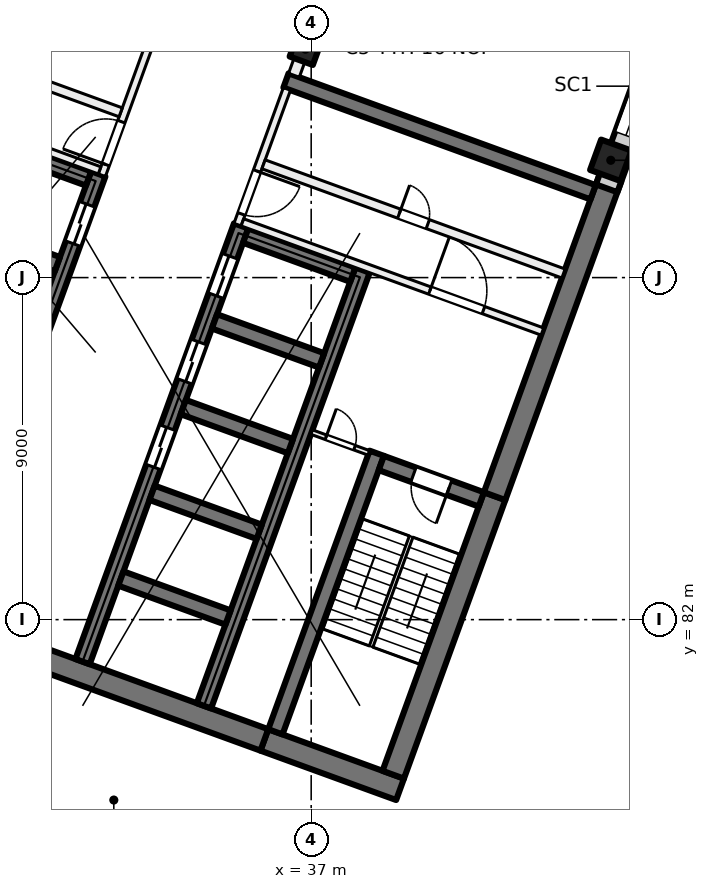
"""IFC4 building model, lengths in metres.
Left out: names, types, materials, properties, quantities, classifications, styles, units other than length and angle.
Written with IfcOpenShell. Run it as: python <this file> out.ifc"""

import sys

from ifc_helpers import new_model, si_unit, direction, frame, frame_2d, origin, origin_2d, place, context, subcontext, project, spatial, rectangle, extrude, element, fill, save


model = new_model("IFC4")
c1 = context("Model", 3, precision=1e-05, world=origin(), true_north=direction((0.0, 1.0)))
c2 = subcontext(c1, "Body", "Model", "MODEL_VIEW")
j1 = project(units=[si_unit("LENGTHUNIT", "METRE"), si_unit("PLANEANGLEUNIT", "RADIAN")], contexts=[c1])
p1 = place(None, origin())
s1 = spatial("IfcSite", under=j1, at=p1, CompositionType="ELEMENT")
p2 = place(p1, origin())
s2 = spatial("IfcBuilding", under=s1, at=p2, CompositionType="ELEMENT")
p3 = place(p2, frame((0.0, 0.0, 101.0)))
s3 = spatial("IfcBuildingStorey", under=s2, at=p3, CompositionType="ELEMENT", Elevation=101.0)
p4 = place(p3, frame((36.849, 97.011, 0.0), z_axis=(0.0, 0.0, 1.0), x_axis=(-0.342020143326, -0.939692620786, 0.0)))
e1 = element("IfcColumn", 1, at=p4, inside=s3, PredefinedType="COLUMN", context=c2, shape_type="SweptSolid", body=[
    extrude(rectangle(XDim=0.65, YDim=0.65, at=origin_2d()), origin(), (0.0, 0.0, 1.0), 4.0),
])
p5 = place(p3, frame((44.884, 94.087, 0.0), z_axis=(0.0, 0.0, 1.0), x_axis=(-0.342020143326, -0.939692620786, 0.0)))
e2 = element("IfcColumn", 2, at=p5, inside=s3, PredefinedType="COLUMN", context=c2, shape_type="SweptSolid", body=[
    extrude(rectangle(XDim=0.85, YDim=0.85, at=origin_2d()), origin(), (0.0, 0.0, 1.0), 4.0),
])
p6 = place(p3, frame((39.338, 77.535, 0.0), z_axis=(0.0, 0.0, 1.0), x_axis=(-0.939701471648, 0.341995824804, 0.0)))
e3 = element("IfcWall", 3, at=p6, inside=s3, PredefinedType="SHEAR", context=c2, shape_type="SweptSolid", body=[
    extrude(rectangle(XDim=3.8, YDim=0.6, at=frame_2d((1.9, 0.0))), origin(), (0.0, 0.0, 1.0), 4.0),
])
p7 = place(p3, frame((35.767, 78.835, 0.0), z_axis=(0.0, 0.0, 1.0), x_axis=(-0.939692894512, 0.342019391267, 0.0)))
e4 = element("IfcWall", 4, at=p7, inside=s3, PredefinedType="SHEAR", context=c2, shape_type="SweptSolid", body=[
    extrude(rectangle(XDim=14.4, YDim=0.6, at=frame_2d((7.2, 0.0))), origin(), (0.0, 0.0, 1.0), 4.0),
])
p8 = place(p3, frame((39.159, 77.92, 0.0), z_axis=(0.0, 0.0, 1.0), x_axis=(0.342016982193, 0.939693771338, 0.0)))
e5 = element("IfcWall", 5, at=p8, inside=s3, PredefinedType="SHEAR", context=c2, shape_type="SweptSolid", body=[
    extrude(rectangle(XDim=7.8, YDim=0.6, at=frame_2d((3.9, 0.0))), origin(), (0.0, 0.0, 1.0), 4.0),
])
p9 = place(p3, frame((41.827, 85.249, 0.0), z_axis=(0.0, 0.0, 1.0), x_axis=(0.342017595281, 0.939693548195, 0.0)))
e6 = element("IfcWall", 6, at=p9, inside=s3, PredefinedType="SHEAR", context=c2, shape_type="SweptSolid", body=[
    extrude(rectangle(XDim=8.925, YDim=0.6, at=frame_2d((4.462, 0.0))), origin(), (0.0, 0.0, 1.0), 4.0),
])
p10 = place(p3, frame((36.058, 79.048, 0.0), z_axis=(0.0, 0.0, 1.0), x_axis=(0.342016982193, 0.939693771338, 0.0)))
e7 = element("IfcWall", 7, at=p10, inside=s3, PredefinedType="SHEAR", context=c2, shape_type="SweptSolid", body=[
    extrude(rectangle(XDim=7.8, YDim=0.4, at=frame_2d((3.9, 0.0))), origin(), (0.0, 0.0, 1.0), 4.0),
])
p11 = place(p3, frame((41.476, 85.164, 0.0), z_axis=(0.0, 0.0, 1.0), x_axis=(-0.939678810556, 0.342058084236, 0.0)))
e8 = element("IfcWall", 8, at=p11, inside=s3, PredefinedType="SHEAR", context=c2, shape_type="SweptSolid", body=[
    extrude(rectangle(XDim=2.8, YDim=0.4, at=frame_2d((1.4, 0.0))), origin(), (0.0, 0.0, 1.0), 4.0),
])
p12 = place(p11, frame((0.9, 0.0, 0.0)))
e9 = element("IfcOpeningElement", 9, at=p12, cuts=e8, PredefinedType="OPENING", context=c2, shape_type="SweptSolid", body=[
    extrude(rectangle(XDim=1.0, YDim=2.1, at=frame_2d((0.5, 1.05))), frame((0.0, 0.21, 0.0), z_axis=(0.0, -1.0, 0.0), x_axis=(1.0, 0.0, 0.0)), (0.0, 0.0, 1.0), 0.42),
])
p13 = place(p3, frame((30.984, 80.895, 0.0), z_axis=(0.0, 0.0, 1.0), x_axis=(0.342021021735, 0.939692301071, 0.0)))
e10 = element("IfcWall", 10, at=p13, inside=s3, PredefinedType="SHEAR", context=c2, shape_type="SweptSolid", body=[
    extrude(rectangle(XDim=12.2, YDim=0.4, at=frame_2d((6.1, 0.0))), origin(), (0.0, 0.0, 1.0), 4.0),
])
p14 = place(p13, frame((5.45, 0.0, 0.0)))
e11 = element("IfcOpeningElement", 11, at=p14, cuts=e10, PredefinedType="OPENING", context=c2, shape_type="SweptSolid", body=[
    extrude(rectangle(XDim=1.1, YDim=2.1, at=frame_2d((0.55, 1.05))), frame((0.0, 0.21, 0.0), z_axis=(0.0, -1.0, 0.0), x_axis=(1.0, 0.0, 0.0)), (0.0, 0.0, 1.0), 0.42),
])
p15 = place(p13, frame((7.85, 0.0, 0.0)))
e12 = element("IfcOpeningElement", 12, at=p15, cuts=e10, PredefinedType="OPENING", context=c2, shape_type="SweptSolid", body=[
    extrude(rectangle(XDim=1.1, YDim=2.1, at=frame_2d((0.55, 1.05))), frame((0.0, 0.21, 0.0), z_axis=(0.0, -1.0, 0.0), x_axis=(1.0, 0.0, 0.0)), (0.0, 0.0, 1.0), 0.42),
])
p16 = place(p13, frame((10.25, 0.0, 0.0)))
e13 = element("IfcOpeningElement", 13, at=p16, cuts=e10, PredefinedType="OPENING", context=c2, shape_type="SweptSolid", body=[
    extrude(rectangle(XDim=1.1, YDim=2.1, at=frame_2d((0.55, 1.05))), frame((0.0, 0.21, 0.0), z_axis=(0.0, -1.0, 0.0), x_axis=(1.0, 0.0, 0.0)), (0.0, 0.0, 1.0), 0.42),
])
p17 = place(p3, frame((34.178, 79.732, 0.0), z_axis=(0.0, 0.0, 1.0), x_axis=(0.342014590177, 0.939694641948, 0.0)))
e14 = element("IfcWall", 14, at=p17, inside=s3, PredefinedType="SHEAR", context=c2, shape_type="SweptSolid", body=[
    extrude(rectangle(XDim=12.2, YDim=0.4, at=frame_2d((6.1, 0.0))), origin(), (0.0, 0.0, 1.0), 4.0),
])
for number, where, z_axis, x_axis in (
    (15, (34.812, 82.056, 0.0), (0.0, 0.0, 1.0), (-0.94, 0.342, 0.0)),
    (16, (35.632, 84.311, 0.0), (0.0, 0.0, 1.0), (-0.94, 0.342, 0.0)),
    (17, (36.453, 86.566, 0.0), (0.0, 0.0, 1.0), (-0.94, 0.342, 0.0)),
    (18, (37.274, 88.822, 0.0), (0.0, 0.0, 1.0), (-0.94, 0.342, 0.0)),
):
    element("IfcWall", number, at=place(p3, frame(where, z_axis=z_axis, x_axis=x_axis)), inside=s3, PredefinedType="SHEAR", context=c2, shape_type="SweptSolid", body=[
        extrude(rectangle(XDim=3.0, YDim=0.4, at=frame_2d((1.5, 0.0))), origin(), (0.0, 0.0, 1.0), 4.0),
    ])
p18 = place(p3, frame((38.095, 91.077, 0.0), z_axis=(0.0, 0.0, 1.0), x_axis=(-0.939676934218, 0.342063238742, 0.0)))
e19 = element("IfcWall", 19, at=p18, inside=s3, PredefinedType="SHEAR", context=c2, shape_type="SweptSolid", body=[
    extrude(rectangle(XDim=3.0, YDim=0.4, at=frame_2d((1.5, 0.0))), origin(), (0.0, 0.0, 1.0), 4.0),
])
p19 = place(p3, frame((27.225, 82.263, 0.0), z_axis=(0.0, 0.0, 1.0), x_axis=(0.342014590177, 0.939694641948, 0.0)))
e20 = element("IfcWall", 20, at=p19, inside=s3, PredefinedType="SHEAR", context=c2, shape_type="SweptSolid", body=[
    extrude(rectangle(XDim=12.2, YDim=0.4, at=frame_2d((6.1, 0.0))), origin(), (0.0, 0.0, 1.0), 4.0),
])
p20 = place(p19, frame((10.25, 0.0, 0.0)))
e21 = element("IfcOpeningElement", 21, at=p20, cuts=e20, PredefinedType="OPENING", context=c2, shape_type="SweptSolid", body=[
    extrude(rectangle(XDim=1.1, YDim=2.1, at=frame_2d((0.55, 1.05))), frame((0.0, 0.21, 0.0), z_axis=(0.0, -1.0, 0.0), x_axis=(1.0, 0.0, 0.0)), (0.0, 0.0, 1.0), 0.42),
])
p21 = place(p19, frame((0.7, 0.0, 0.0)))
e22 = element("IfcOpeningElement", 22, at=p21, cuts=e20, PredefinedType="OPENING", context=c2, shape_type="SweptSolid", body=[
    extrude(rectangle(XDim=0.8, YDim=2.1, at=frame_2d((0.4, 1.05))), frame((0.0, 0.21, 0.0), z_axis=(0.0, -1.0, 0.0), x_axis=(1.0, 0.0, 0.0)), (0.0, 0.0, 1.0), 0.42),
])
for number, where, z_axis, x_axis in (
    (23, (30.32, 91.353, 0.0), (0.0, 0.0, 1.0), (-0.94, 0.342, 0.0)),
    (24, (31.141, 93.608, 0.0), (0.0, 0.0, 1.0), (-0.94, 0.342, 0.0)),
):
    element("IfcWall", number, at=place(p3, frame(where, z_axis=z_axis, x_axis=x_axis)), inside=s3, PredefinedType="SHEAR", context=c2, shape_type="SweptSolid", body=[
        extrude(rectangle(XDim=3.0, YDim=0.4, at=frame_2d((1.5, 0.0))), origin(), (0.0, 0.0, 1.0), 4.0),
    ])
p22 = place(p3, frame((44.418, 93.245, 0.0), z_axis=(0.0, 0.0, 1.0), x_axis=(-0.93969060187, 0.342025690201, 0.0)))
e25 = element("IfcWall", 25, at=p22, inside=s3, PredefinedType="SHEAR", context=c2, shape_type="SweptSolid", body=[
    extrude(rectangle(XDim=8.6, YDim=0.4, at=frame_2d((4.3, 0.0))), origin(), (0.0, 0.0, 1.0), 4.0),
])
p23 = place(p3, frame((52.212, 113.783, 0.0), z_axis=(0.0, 0.0, 1.0), x_axis=(-0.34202521188, -0.939690775968, 0.0)))
e26 = element("IfcWall", 26, at=p23, inside=s3, PredefinedType="SOLIDWALL", context=c2, shape_type="SweptSolid", body=[
    extrude(rectangle(XDim=21.745, YDim=0.6, at=frame_2d((10.873, 0.0))), origin(), (0.0, 0.0, 1.0), 3.625),
])
p24 = place(p23, frame((3.765, 0.0, 0.9)))
e27 = element("IfcOpeningElement", 27, at=p24, cuts=e26, PredefinedType="OPENING", context=c2, shape_type="SweptSolid", body=[
    extrude(rectangle(XDim=3.0, YDim=2.4, at=frame_2d((1.5, 1.2))), frame((0.0, 0.31, 0.0), z_axis=(0.0, -1.0, 0.0), x_axis=(1.0, 0.0, 0.0)), (0.0, 0.0, 1.0), 0.62),
])
p25 = place(p23, frame((8.265, 0.0, 0.9)))
e28 = element("IfcOpeningElement", 28, at=p25, cuts=e26, PredefinedType="OPENING", context=c2, shape_type="SweptSolid", body=[
    extrude(rectangle(XDim=3.0, YDim=2.4, at=frame_2d((1.5, 1.2))), frame((0.0, 0.31, 0.0), z_axis=(0.0, -1.0, 0.0), x_axis=(1.0, 0.0, 0.0)), (0.0, 0.0, 1.0), 0.62),
])
p26 = place(p23, frame((12.765, 0.0, 0.9)))
e29 = element("IfcOpeningElement", 29, at=p26, cuts=e26, PredefinedType="OPENING", context=c2, shape_type="SweptSolid", body=[
    extrude(rectangle(XDim=3.0, YDim=2.4, at=frame_2d((1.5, 1.2))), frame((0.0, 0.31, 0.0), z_axis=(0.0, -1.0, 0.0), x_axis=(1.0, 0.0, 0.0)), (0.0, 0.0, 1.0), 0.62),
])
p27 = place(p23, frame((17.265, 0.0, 0.9)))
e30 = element("IfcOpeningElement", 30, at=p27, cuts=e26, PredefinedType="OPENING", context=c2, shape_type="SweptSolid", body=[
    extrude(rectangle(XDim=3.0, YDim=2.4, at=frame_2d((1.5, 1.2))), frame((0.0, 0.31, 0.0), z_axis=(0.0, -1.0, 0.0), x_axis=(1.0, 0.0, 0.0)), (0.0, 0.0, 1.0), 0.62),
])
p28 = place(p3, frame((31.491, 93.693, 0.0), z_axis=(0.0, 0.0, 1.0), x_axis=(0.341995824804, 0.939701471648, 0.0)))
e31 = element("IfcWall", 31, at=p28, inside=s3, PredefinedType="PARTITIONING", context=c2, shape_type="SweptSolid", body=[
    extrude(rectangle(XDim=3.8, YDim=0.2, at=frame_2d((1.9, 0.0))), origin(), (0.0, 0.0, 1.0), 3.625),
])
p29 = place(p28, frame((0.3, 0.0, 0.0)))
e32 = element("IfcOpeningElement", 32, at=p29, cuts=e31, PredefinedType="OPENING", context=c2, shape_type="SweptSolid", body=[
    extrude(rectangle(XDim=1.2, YDim=2.1, at=frame_2d((0.6, 1.05))), frame((0.0, 0.11, 0.0), z_axis=(0.0, -1.0, 0.0), x_axis=(1.0, 0.0, 0.0)), (0.0, 0.0, 1.0), 0.22),
])
p30 = place(p3, frame((23.538, 96.694, 0.0), z_axis=(0.0, 0.0, 1.0), x_axis=(0.939691552312, -0.342023078919, 0.0)))
e33 = element("IfcWall", 33, at=p30, inside=s3, PredefinedType="PARTITIONING", context=c2, shape_type="SweptSolid", body=[
    extrude(rectangle(XDim=8.4, YDim=0.2, at=frame_2d((4.2, 0.0))), origin(), (0.0, 0.0, 1.0), 3.625),
])
p31 = place(p30, frame((1.65, 0.0, 0.0)))
e34 = element("IfcOpeningElement", 34, at=p31, cuts=e33, PredefinedType="OPENING", context=c2, shape_type="SweptSolid", body=[
    extrude(rectangle(XDim=1.5, YDim=2.1, at=frame_2d((0.75, 1.05))), frame((0.0, 0.11, 0.0), z_axis=(0.0, -1.0, 0.0), x_axis=(1.0, 0.0, 0.0)), (0.0, 0.0, 1.0), 0.22),
])
p32 = place(p3, frame((24.094, 98.221, 0.0), z_axis=(0.0, 0.0, 1.0), x_axis=(0.939691552312, -0.342023078919, 0.0)))
e35 = element("IfcWall", 35, at=p32, inside=s3, PredefinedType="PARTITIONING", context=c2, shape_type="SweptSolid", body=[
    extrude(rectangle(XDim=8.4, YDim=0.25, at=frame_2d((4.2, 0.0))), origin(), (0.0, 0.0, 1.0), 3.625),
])
p33 = place(p32, frame((5.125, 0.0, 0.0)))
e36 = element("IfcOpeningElement", 36, at=p33, cuts=e35, PredefinedType="OPENING", context=c2, shape_type="SweptSolid", body=[
    extrude(rectangle(XDim=1.0, YDim=2.1, at=frame_2d((0.5, 1.05))), frame((0.0, 0.135, 0.0), z_axis=(0.0, -1.0, 0.0), x_axis=(1.0, 0.0, 0.0)), (0.0, 0.0, 1.0), 0.27),
])
p34 = place(p32, frame((0.875, 0.0, 0.0)))
e37 = element("IfcOpeningElement", 37, at=p34, cuts=e35, PredefinedType="OPENING", context=c2, shape_type="SweptSolid", body=[
    extrude(rectangle(XDim=1.0, YDim=2.1, at=frame_2d((0.5, 1.05))), frame((0.0, 0.135, 0.0), z_axis=(0.0, -1.0, 0.0), x_axis=(1.0, 0.0, 0.0)), (0.0, 0.0, 1.0), 0.27),
])
p35 = place(p3, frame((36.362, 95.964, 0.0), z_axis=(0.0, 0.0, 1.0), x_axis=(-0.341995824804, -0.939701471648, 0.0)))
e38 = element("IfcWall", 38, at=p35, inside=s3, PredefinedType="PARTITIONING", context=c2, shape_type="SweptSolid", body=[
    extrude(rectangle(XDim=3.8, YDim=0.2, at=frame_2d((1.9, 0.0))), origin(), (0.0, 0.0, 1.0), 3.625),
])
p36 = place(p35, frame((2.3, 0.0, 0.0)))
e39 = element("IfcOpeningElement", 39, at=p36, cuts=e38, PredefinedType="OPENING", context=c2, shape_type="SweptSolid", body=[
    extrude(rectangle(XDim=1.2, YDim=2.1, at=frame_2d((0.6, 1.05))), frame((0.0, 0.11, 0.0), z_axis=(0.0, -1.0, 0.0), x_axis=(1.0, 0.0, 0.0)), (0.0, 0.0, 1.0), 0.22),
])
p37 = place(p3, frame((35.19, 92.453, 0.0), z_axis=(0.0, 0.0, 1.0), x_axis=(0.939691552312, -0.342023078919, 0.0)))
e40 = element("IfcWall", 40, at=p37, inside=s3, PredefinedType="PARTITIONING", context=c2, shape_type="SweptSolid", body=[
    extrude(rectangle(XDim=8.4, YDim=0.2, at=frame_2d((4.2, 0.0))), origin(), (0.0, 0.0, 1.0), 3.625),
])
p38 = place(p37, frame((5.25, 0.0, 0.0)))
e41 = element("IfcOpeningElement", 41, at=p38, cuts=e40, PredefinedType="OPENING", context=c2, shape_type="SweptSolid", body=[
    extrude(rectangle(XDim=1.5, YDim=2.1, at=frame_2d((0.75, 1.05))), frame((0.0, 0.11, 0.0), z_axis=(0.0, -1.0, 0.0), x_axis=(1.0, 0.0, 0.0)), (0.0, 0.0, 1.0), 0.22),
])
p39 = place(p3, frame((35.746, 93.98, 0.0), z_axis=(0.0, 0.0, 1.0), x_axis=(0.939691552312, -0.342023078919, 0.0)))
e42 = element("IfcWall", 42, at=p39, inside=s3, PredefinedType="PARTITIONING", context=c2, shape_type="SweptSolid", body=[
    extrude(rectangle(XDim=8.4, YDim=0.25, at=frame_2d((4.2, 0.0))), origin(), (0.0, 0.0, 1.0), 3.625),
])
p40 = place(p39, frame((3.8, 0.0, 0.0)))
e43 = element("IfcOpeningElement", 43, at=p40, cuts=e42, PredefinedType="OPENING", context=c2, shape_type="SweptSolid", body=[
    extrude(rectangle(XDim=0.8, YDim=2.1, at=frame_2d((0.4, 1.05))), frame((0.0, 0.135, 0.0), z_axis=(0.0, -1.0, 0.0), x_axis=(1.0, 0.0, 0.0)), (0.0, 0.0, 1.0), 0.27),
])
p41 = place(p3, frame((37.013, 86.935, 0.0), z_axis=(0.0, 0.0, 1.0), x_axis=(0.939659694648, -0.342110593602, 0.0)))
e44 = element("IfcWall", 44, at=p41, inside=s3, PredefinedType="PARTITIONING", context=c2, shape_type="SweptSolid", body=[
    extrude(rectangle(XDim=1.6, YDim=0.125, at=frame_2d((0.8, 0.0))), origin(), (0.0, 0.0, 1.0), 3.625),
])
p42 = place(p41, frame((0.4, 0.0, 0.0)))
e45 = element("IfcOpeningElement", 45, at=p42, cuts=e44, PredefinedType="OPENING", context=c2, shape_type="SweptSolid", body=[
    extrude(rectangle(XDim=0.8, YDim=2.1, at=frame_2d((0.4, 1.05))), frame((0.0, 0.073, 0.0), z_axis=(0.0, -1.0, 0.0), x_axis=(1.0, 0.0, 0.0)), (0.0, 0.0, 1.0), 0.145),
])
p43 = place(p3, frame((47.314, 125.909, 0.0), z_axis=(0.0, 0.0, 1.0), x_axis=(-0.342010770371, -0.939696032209, 0.0)))
e46 = element("IfcWall", 46, at=p43, inside=s3, PredefinedType="PARTITIONING", context=c2, shape_type="SweptSolid", body=[
    extrude(rectangle(XDim=31.485, YDim=0.3, at=frame_2d((15.742, 0.0))), origin(), (0.0, 0.0, 1.0), 3.625),
])
p44 = place(p43, frame((26.11, 0.0, 0.0)))
e47 = element("IfcOpeningElement", 47, at=p44, cuts=e46, PredefinedType="OPENING", context=c2, shape_type="SweptSolid", body=[
    extrude(rectangle(XDim=1.0, YDim=2.1, at=frame_2d((0.5, 1.05))), frame((0.0, 0.16, 0.0), z_axis=(0.0, -1.0, 0.0), x_axis=(1.0, 0.0, 0.0)), (0.0, 0.0, 1.0), 0.32),
])
p45 = place(p43, frame((15.485, 0.0, 0.0)))
e48 = element("IfcOpeningElement", 48, at=p45, cuts=e46, PredefinedType="OPENING", context=c2, shape_type="SweptSolid", body=[
    extrude(rectangle(XDim=1.0, YDim=2.1, at=frame_2d((0.5, 1.05))), frame((0.0, 0.16, 0.0), z_axis=(0.0, -1.0, 0.0), x_axis=(1.0, 0.0, 0.0)), (0.0, 0.0, 1.0), 0.32),
])
p46 = place(p43, frame((9.985, 0.0, 0.0)))
e49 = element("IfcOpeningElement", 49, at=p46, cuts=e46, PredefinedType="OPENING", context=c2, shape_type="SweptSolid", body=[
    extrude(rectangle(XDim=1.0, YDim=2.1, at=frame_2d((0.5, 1.05))), frame((0.0, 0.16, 0.0), z_axis=(0.0, -1.0, 0.0), x_axis=(1.0, 0.0, 0.0)), (0.0, 0.0, 1.0), 0.32),
])
p47 = place(p43, frame((5.484, 0.0, 0.0)))
e50 = element("IfcOpeningElement", 50, at=p47, cuts=e46, PredefinedType="OPENING", context=c2, shape_type="SweptSolid", body=[
    extrude(rectangle(XDim=1.0, YDim=2.1, at=frame_2d((0.5, 1.05))), frame((0.0, 0.16, 0.0), z_axis=(0.0, -1.0, 0.0), x_axis=(1.0, 0.0, 0.0)), (0.0, 0.0, 1.0), 0.32),
])
p48 = place(p27, origin())
e51 = element("IfcWindow", 51, at=p48, inside=s3, PartitioningType="SINGLE_PANEL", PredefinedType="WINDOW", context=c2, shape_type="SweptSolid", body=[
    extrude(rectangle(XDim=3.0, YDim=2.4, at=frame_2d((1.5, 1.2))), frame((0.0, 0.03, 0.0), z_axis=(0.0, -1.0, 0.0), x_axis=(1.0, 0.0, 0.0)), (0.0, 0.0, 1.0), 0.06),
])
fill(e30, e51)
p49 = place(p20, origin())
e52 = element("IfcDoor", 52, at=p49, inside=s3, OperationType="DOUBLE_DOOR_SLIDING", PredefinedType="DOOR", context=c2, shape_type="SweptSolid", body=[
    extrude(rectangle(XDim=1.1, YDim=2.1, at=frame_2d((0.55, 1.05))), frame((0.0, 0.025, 0.0), z_axis=(0.0, -1.0, 0.0), x_axis=(1.0, 0.0, 0.0)), (0.0, 0.0, 1.0), 0.05),
])
fill(e21, e52)
p50 = place(p14, origin())
e53 = element("IfcDoor", 53, at=p50, inside=s3, OperationType="DOUBLE_DOOR_SLIDING", PredefinedType="DOOR", context=c2, shape_type="SweptSolid", body=[
    extrude(rectangle(XDim=1.1, YDim=2.1, at=frame_2d((0.55, 1.05))), frame((0.0, 0.025, 0.0), z_axis=(0.0, -1.0, 0.0), x_axis=(1.0, 0.0, 0.0)), (0.0, 0.0, 1.0), 0.05),
])
fill(e11, e53)
p51 = place(p15, origin())
e54 = element("IfcDoor", 54, at=p51, inside=s3, OperationType="DOUBLE_DOOR_SLIDING", PredefinedType="DOOR", context=c2, shape_type="SweptSolid", body=[
    extrude(rectangle(XDim=1.1, YDim=2.1, at=frame_2d((0.55, 1.05))), frame((0.0, 0.025, 0.0), z_axis=(0.0, -1.0, 0.0), x_axis=(1.0, 0.0, 0.0)), (0.0, 0.0, 1.0), 0.05),
])
fill(e12, e54)
p52 = place(p16, origin())
e55 = element("IfcDoor", 55, at=p52, inside=s3, OperationType="DOUBLE_DOOR_SLIDING", PredefinedType="DOOR", context=c2, shape_type="SweptSolid", body=[
    extrude(rectangle(XDim=1.1, YDim=2.1, at=frame_2d((0.55, 1.05))), frame((0.0, 0.025, 0.0), z_axis=(0.0, -1.0, 0.0), x_axis=(1.0, 0.0, 0.0)), (0.0, 0.0, 1.0), 0.05),
])
fill(e13, e55)
p53 = place(p29, origin())
e56 = element("IfcDoor", 56, at=p53, inside=s3, OperationType="DOUBLE_DOOR_SINGLE_SWING", PredefinedType="DOOR", context=c2, shape_type="SweptSolid", body=[
    extrude(rectangle(XDim=1.2, YDim=2.1, at=frame_2d((0.6, 1.05))), frame((0.0, 0.025, 0.0), z_axis=(0.0, -1.0, 0.0), x_axis=(1.0, 0.0, 0.0)), (0.0, 0.0, 1.0), 0.05),
])
fill(e32, e56)
p54 = place(p36, origin())
e57 = element("IfcDoor", 57, at=p54, inside=s3, OperationType="DOUBLE_DOOR_SINGLE_SWING", PredefinedType="DOOR", context=c2, shape_type="SweptSolid", body=[
    extrude(rectangle(XDim=1.2, YDim=2.1, at=frame_2d((0.6, 1.05))), frame((0.0, 0.025, 0.0), z_axis=(0.0, -1.0, 0.0), x_axis=(1.0, 0.0, 0.0)), (0.0, 0.0, 1.0), 0.05),
])
fill(e39, e57)
p55 = place(p38, origin())
e58 = element("IfcDoor", 58, at=p55, inside=s3, OperationType="DOUBLE_DOOR_SINGLE_SWING", PredefinedType="DOOR", context=c2, shape_type="SweptSolid", body=[
    extrude(rectangle(XDim=1.5, YDim=2.1, at=frame_2d((0.75, 1.05))), frame((0.0, 0.025, 0.0), z_axis=(0.0, -1.0, 0.0), x_axis=(1.0, 0.0, 0.0)), (0.0, 0.0, 1.0), 0.05),
])
fill(e41, e58)
p56 = place(p12, origin())
e59 = element("IfcDoor", 59, at=p56, inside=s3, OperationType="SINGLE_SWING_RIGHT", PredefinedType="DOOR", context=c2, shape_type="SweptSolid", body=[
    extrude(rectangle(XDim=1.0, YDim=2.1, at=frame_2d((0.5, 1.05))), frame((0.0, 0.025, 0.0), z_axis=(0.0, -1.0, 0.0), x_axis=(1.0, 0.0, 0.0)), (0.0, 0.0, 1.0), 0.05),
])
fill(e9, e59)
p57 = place(p42, origin())
e60 = element("IfcDoor", 60, at=p57, inside=s3, OperationType="SINGLE_SWING_LEFT", PredefinedType="DOOR", context=c2, shape_type="SweptSolid", body=[
    extrude(rectangle(XDim=0.8, YDim=2.1, at=frame_2d((0.4, 1.05))), frame((0.0, 0.025, 0.0), z_axis=(0.0, -1.0, 0.0), x_axis=(1.0, 0.0, 0.0)), (0.0, 0.0, 1.0), 0.05),
])
fill(e45, e60)
p58 = place(p40, origin())
e61 = element("IfcDoor", 61, at=p58, inside=s3, OperationType="SINGLE_SWING_RIGHT", PredefinedType="DOOR", context=c2, shape_type="SweptSolid", body=[
    extrude(rectangle(XDim=0.8, YDim=2.1, at=frame_2d((0.4, 1.05))), frame((0.0, 0.025, 0.0), z_axis=(0.0, -1.0, 0.0), x_axis=(1.0, 0.0, 0.0)), (0.0, 0.0, 1.0), 0.05),
])
fill(e43, e61)
save(model, sys.argv[1])
